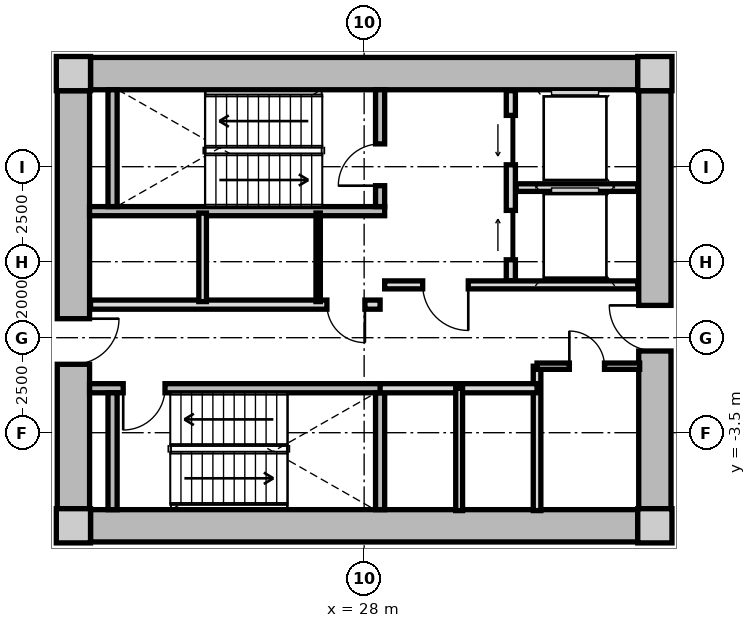
"""IFC4 building model, lengths in metres.
Left out: names, types, materials, properties, quantities, classifications, styles, units other than length and angle.
Written with IfcOpenShell. Run it as: python <this file> out.ifc"""

import sys

from ifc_helpers import new_model, si_unit, direction, frame, frame_2d, origin, origin_2d, place, context, subcontext, project, spatial, rectangle, extrude, source, transform, mapped, element, fill, save


model = new_model("IFC4")
c1 = context("Model", 3, precision=1e-05, world=origin(), true_north=direction((0.0, 1.0)))
c2 = subcontext(c1, "Body", "Model", "MODEL_VIEW")
j1 = project(units=[si_unit("LENGTHUNIT", "METRE"), si_unit("PLANEANGLEUNIT", "RADIAN")], contexts=[c1])
p1 = place(None, origin())
s1 = spatial("IfcSite", under=j1, at=p1, CompositionType="ELEMENT")
p2 = place(p1, origin())
s2 = spatial("IfcBuilding", under=s1, at=p2, CompositionType="ELEMENT")
p3 = place(p2, frame((0.0, 0.0, -4.2)))
s3 = spatial("IfcBuildingStorey", under=s2, at=p3, CompositionType="ELEMENT", Elevation=-4.2)
m1 = source(origin(), c2, "Body", "SweptSolid", [
    extrude(rectangle(XDim=0.9, YDim=0.9, at=origin_2d()), origin(), (0.0, 0.0, 1.0), 4.2),
])
for number, where, z_axis, x_axis in (
    (1, (20.35, -5.95, 0.0), (0.0, 0.0, 1.0), (1.0, 0.0, 0.0)),
    (2, (35.65, -5.95, 0.0), (0.0, 0.0, 1.0), (1.0, 0.0, 0.0)),
    (3, (35.65, 5.95, 0.0), (0.0, 0.0, 1.0), (1.0, 0.0, 0.0)),
    (4, (20.35, 5.95, 0.0), (0.0, 0.0, 1.0), (1.0, 0.0, 0.0)),
):
    element("IfcColumn", number, at=place(p3, frame(where, z_axis=z_axis, x_axis=x_axis)), inside=s3, PredefinedType="COLUMN", context=c2, shape_type="MappedRepresentation", body=[
        mapped(m1, transform((0.0, 0.0, 0.0), x_axis=(1.0, 0.0, 0.0), y_axis=(0.0, 1.0, 0.0), z_axis=(0.0, 0.0, 1.0), scale=1.0)),
    ])
m2 = source(origin(), c2, "Body", "SweptSolid", [
    extrude(rectangle(XDim=14.4, YDim=0.85, at=frame_2d((7.2, 0.0))), origin(), (0.0, 0.0, 1.0), 3.88),
])
for number, where, z_axis, x_axis in (
    (5, (20.8, 5.95, 0.0), (0.0, 0.0, 1.0), (1.0, 0.0, 0.0)),
    (6, (35.2, -5.95, 0.0), (0.0, 0.0, 1.0), (-1.0, 0.0, 0.0)),
):
    element("IfcWall", number, at=place(p3, frame(where, z_axis=z_axis, x_axis=x_axis)), inside=s3, PredefinedType="SHEAR", context=c2, shape_type="MappedRepresentation", body=[
        mapped(m2, transform((0.0, 0.0, 0.0), x_axis=(1.0, 0.0, 0.0), y_axis=(0.0, 1.0, 0.0), z_axis=(0.0, 0.0, 1.0), scale=1.0)),
    ])
m3 = source(origin(), c2, "Body", "SweptSolid", [
    extrude(rectangle(XDim=11.0, YDim=0.85, at=frame_2d((5.5, 0.0))), origin(), (0.0, 0.0, 1.0), 3.88),
])
p4 = place(p3, frame((20.35, -5.5, 0.0), z_axis=(0.0, 0.0, 1.0), x_axis=(0.0, 1.0, 0.0)))
e7 = element("IfcWall", 7, at=p4, inside=s3, PredefinedType="SHEAR", context=c2, shape_type="MappedRepresentation", body=[
    mapped(m3, transform((0.0, 0.0, 0.0), x_axis=(1.0, 0.0, 0.0), y_axis=(0.0, 1.0, 0.0), z_axis=(0.0, 0.0, 1.0), scale=1.0)),
])
p5 = place(p4, frame((3.8, 0.0, 0.0)))
e8 = element("IfcOpeningElement", 8, at=p5, cuts=e7, PredefinedType="OPENING", context=c2, shape_type="SweptSolid", body=[
    extrude(rectangle(XDim=1.2, YDim=2.15, at=frame_2d((0.6, 1.075))), frame((0.0, 0.435, 0.0), z_axis=(0.0, -1.0, 0.0), x_axis=(1.0, 0.0, 0.0)), (0.0, 0.0, 1.0), 0.87),
])
p6 = place(p3, frame((35.65, 5.5, 0.0), z_axis=(0.0, 0.0, 1.0), x_axis=(0.0, -1.0, 0.0)))
e9 = element("IfcWall", 9, at=p6, inside=s3, PredefinedType="SHEAR", context=c2, shape_type="MappedRepresentation", body=[
    mapped(m3, transform((0.0, 0.0, 0.0), x_axis=(1.0, 0.0, 0.0), y_axis=(0.0, 1.0, 0.0), z_axis=(0.0, 0.0, 1.0), scale=1.0)),
])
p7 = place(p6, frame((5.65, 0.0, 0.0)))
e10 = element("IfcOpeningElement", 10, at=p7, cuts=e9, PredefinedType="OPENING", context=c2, shape_type="SweptSolid", body=[
    extrude(rectangle(XDim=1.2, YDim=2.15, at=frame_2d((0.6, 1.075))), frame((0.0, 0.435, 0.0), z_axis=(0.0, -1.0, 0.0), x_axis=(1.0, 0.0, 0.0)), (0.0, 0.0, 1.0), 0.87),
])
m4 = source(origin(), c2, "Body", "SweptSolid", [
    extrude(rectangle(XDim=7.765, YDim=0.24, at=frame_2d((3.883, 0.0))), origin(), (0.0, 0.0, 1.0), 3.88),
])
p8 = place(p3, frame((20.775, 2.33, 0.0), z_axis=(0.0, 0.0, 1.0), x_axis=(1.0, 0.0, 0.0)))
e11 = element("IfcWall", 11, at=p8, inside=s3, PredefinedType="PARTITIONING", context=c2, shape_type="MappedRepresentation", body=[
    mapped(m4, transform((0.0, 0.0, 0.0), x_axis=(1.0, 0.0, 0.0), y_axis=(0.0, 1.0, 0.0), z_axis=(0.0, 0.0, 1.0), scale=1.0)),
])
m5 = source(origin(), c2, "Body", "SweptSolid", [
    extrude(rectangle(XDim=3.075, YDim=0.24, at=frame_2d((1.538, 0.0))), origin(), (0.0, 0.0, 1.0), 3.88),
])
p9 = place(p3, frame((21.38, 2.45, 0.0), z_axis=(0.0, 0.0, 1.0), x_axis=(0.0, 1.0, 0.0)))
e12 = element("IfcWall", 12, at=p9, inside=s3, PredefinedType="PARTITIONING", context=c2, shape_type="MappedRepresentation", body=[
    mapped(m5, transform((0.0, 0.0, 0.0), x_axis=(1.0, 0.0, 0.0), y_axis=(0.0, 1.0, 0.0), z_axis=(0.0, 0.0, 1.0), scale=1.0)),
])
p10 = place(p3, frame((28.42, 2.45, 0.0), z_axis=(0.0, 0.0, 1.0), x_axis=(0.0, 1.0, 0.0)))
e13 = element("IfcWall", 13, at=p10, inside=s3, PredefinedType="PARTITIONING", context=c2, shape_type="MappedRepresentation", body=[
    mapped(m5, transform((0.0, 0.0, 0.0), x_axis=(1.0, 0.0, 0.0), y_axis=(0.0, 1.0, 0.0), z_axis=(0.0, 0.0, 1.0), scale=1.0)),
])
p11 = place(p10, frame((0.55, 0.0, 0.0)))
e14 = element("IfcOpeningElement", 14, at=p11, cuts=e13, PredefinedType="OPENING", context=c2, shape_type="SweptSolid", body=[
    extrude(rectangle(XDim=1.1, YDim=2.15, at=frame_2d((0.55, 1.075))), frame((0.0, 0.13, 0.0), z_axis=(0.0, -1.0, 0.0), x_axis=(1.0, 0.0, 0.0)), (0.0, 0.0, 1.0), 0.26),
])
p12 = place(p3, frame((20.775, -2.33, 0.0), z_axis=(0.0, 0.0, 1.0), x_axis=(1.0, 0.0, 0.0)))
e15 = element("IfcWall", 15, at=p12, inside=s3, PredefinedType="PARTITIONING", context=c2, shape_type="MappedRepresentation", body=[
    mapped(m4, transform((0.0, 0.0, 0.0), x_axis=(1.0, 0.0, 0.0), y_axis=(0.0, 1.0, 0.0), z_axis=(0.0, 0.0, 1.0), scale=1.0)),
])
p13 = place(p12, frame((0.885, 0.0, 0.0)))
e16 = element("IfcOpeningElement", 16, at=p13, cuts=e15, PredefinedType="OPENING", context=c2, shape_type="SweptSolid", body=[
    extrude(rectangle(XDim=1.1, YDim=2.15, at=frame_2d((0.55, 1.075))), frame((0.0, 0.13, 0.0), z_axis=(0.0, -1.0, 0.0), x_axis=(1.0, 0.0, 0.0)), (0.0, 0.0, 1.0), 0.26),
])
for number, where, z_axis, x_axis in (
    (17, (21.38, -5.525, 0.0), (0.0, 0.0, 1.0), (0.0, 1.0, 0.0)),
    (18, (28.42, -5.525, 0.0), (0.0, 0.0, 1.0), (0.0, 1.0, 0.0)),
):
    element("IfcWall", number, at=place(p3, frame(where, z_axis=z_axis, x_axis=x_axis)), inside=s3, PredefinedType="PARTITIONING", context=c2, shape_type="MappedRepresentation", body=[
        mapped(m5, transform((0.0, 0.0, 0.0), x_axis=(1.0, 0.0, 0.0), y_axis=(0.0, 1.0, 0.0), z_axis=(0.0, 0.0, 1.0), scale=1.0)),
    ])
m6 = source(origin(), c2, "Body", "SweptSolid", [
    extrude(rectangle(XDim=5.0, YDim=0.24, at=frame_2d((2.5, 0.0))), origin(), (0.0, 0.0, 1.0), 3.865),
])
p14 = place(p3, frame((31.86, 0.5, 0.0), z_axis=(0.0, 0.0, 1.0), x_axis=(0.0, 1.0, 0.0)))
e19 = element("IfcWall", 19, at=p14, inside=s3, PredefinedType="PARTITIONING", context=c2, shape_type="MappedRepresentation", body=[
    mapped(m6, transform((0.0, 0.0, 0.0), x_axis=(1.0, 0.0, 0.0), y_axis=(0.0, 1.0, 0.0), z_axis=(0.0, 0.0, 1.0), scale=1.0)),
])
p15 = place(p14, frame((3.05, 0.0, 0.0)))
e20 = element("IfcOpeningElement", 20, at=p15, cuts=e19, PredefinedType="OPENING", context=c2, shape_type="SweptSolid", body=[
    extrude(rectangle(XDim=1.3, YDim=2.2, at=frame_2d((0.65, 1.1))), frame((0.0, 0.13, 0.0), z_axis=(0.0, -1.0, 0.0), x_axis=(1.0, 0.0, 0.0)), (0.0, 0.0, 1.0), 0.26),
])
p16 = place(p14, frame((0.55, 0.0, 0.0)))
e21 = element("IfcOpeningElement", 21, at=p16, cuts=e19, PredefinedType="OPENING", context=c2, shape_type="SweptSolid", body=[
    extrude(rectangle(XDim=1.3, YDim=2.2, at=frame_2d((0.65, 1.1))), frame((0.0, 0.13, 0.0), z_axis=(0.0, -1.0, 0.0), x_axis=(1.0, 0.0, 0.0)), (0.0, 0.0, 1.0), 0.26),
])
m7 = source(origin(), c2, "Body", "SweptSolid", [
    extrude(rectangle(XDim=3.2, YDim=0.2, at=frame_2d((1.6, 0.0))), origin(), (0.0, 0.0, 1.0), 3.865),
])
p17 = place(p3, frame((32.0, 2.95, 0.0), z_axis=(0.0, 0.0, 1.0), x_axis=(1.0, 0.0, 0.0)))
e22 = element("IfcWall", 22, at=p17, inside=s3, PredefinedType="PARTITIONING", context=c2, shape_type="MappedRepresentation", body=[
    mapped(m7, transform((0.0, 0.0, 0.0), x_axis=(1.0, 0.0, 0.0), y_axis=(0.0, 1.0, 0.0), z_axis=(0.0, 0.0, 1.0), scale=1.0)),
])
m8 = source(origin(), c2, "Body", "SweptSolid", [
    extrude(rectangle(XDim=6.66, YDim=0.21, at=frame_2d((3.33, 0.0))), origin(), (0.0, 0.0, 1.0), 3.865),
])
p18 = place(p3, frame((28.54, 0.39, 0.0), z_axis=(0.0, 0.0, 1.0), x_axis=(1.0, 0.0, 0.0)))
e23 = element("IfcWall", 23, at=p18, inside=s3, PredefinedType="PARTITIONING", context=c2, shape_type="MappedRepresentation", body=[
    mapped(m8, transform((0.0, 0.0, 0.0), x_axis=(1.0, 0.0, 0.0), y_axis=(0.0, 1.0, 0.0), z_axis=(0.0, 0.0, 1.0), scale=1.0)),
])
p19 = place(p18, frame((1.0, 0.0, 0.0)))
e24 = element("IfcOpeningElement", 24, at=p19, cuts=e23, PredefinedType="OPENING", context=c2, shape_type="SweptSolid", body=[
    extrude(rectangle(XDim=1.2, YDim=2.15, at=frame_2d((0.6, 1.075))), frame((0.0, 0.115, 0.0), z_axis=(0.0, -1.0, 0.0), x_axis=(1.0, 0.0, 0.0)), (0.0, 0.0, 1.0), 0.23),
])
m9 = source(origin(), c2, "Body", "SweptSolid", [
    extrude(rectangle(XDim=7.62, YDim=0.24, at=frame_2d((3.81, 0.0))), origin(), (0.0, 0.0, 1.0), 3.865),
])
p20 = place(p3, frame((20.8, -0.13, 0.0), z_axis=(0.0, 0.0, 1.0), x_axis=(1.0, 0.0, 0.0)))
e25 = element("IfcWall", 25, at=p20, inside=s3, PredefinedType="PARTITIONING", context=c2, shape_type="MappedRepresentation", body=[
    mapped(m9, transform((0.0, 0.0, 0.0), x_axis=(1.0, 0.0, 0.0), y_axis=(0.0, 1.0, 0.0), z_axis=(0.0, 0.0, 1.0), scale=1.0)),
])
p21 = place(p20, frame((6.22, 0.0, 0.0)))
e26 = element("IfcOpeningElement", 26, at=p21, cuts=e25, PredefinedType="OPENING", context=c2, shape_type="SweptSolid", body=[
    extrude(rectangle(XDim=1.0, YDim=2.1, at=frame_2d((0.5, 1.05))), frame((0.0, 0.13, 0.0), z_axis=(0.0, -1.0, 0.0), x_axis=(1.0, 0.0, 0.0)), (0.0, 0.0, 1.0), 0.26),
])
m10 = source(origin(), c2, "Body", "SweptSolid", [
    extrude(rectangle(XDim=2.33, YDim=0.115, at=frame_2d((1.165, 0.0))), origin(), (0.0, 0.0, 1.0), 3.865),
])
p22 = place(p3, frame((26.79, -0.05, 0.0), z_axis=(0.0, 0.0, 1.0), x_axis=(0.0, 1.0, 0.0)))
e27 = element("IfcWall", 27, at=p22, inside=s3, PredefinedType="PARTITIONING", context=c2, shape_type="MappedRepresentation", body=[
    mapped(m10, transform((0.0, 0.0, 0.0), x_axis=(1.0, 0.0, 0.0), y_axis=(0.0, 1.0, 0.0), z_axis=(0.0, 0.0, 1.0), scale=1.0)),
])
m11 = source(origin(), c2, "Body", "SweptSolid", [
    extrude(rectangle(XDim=2.33, YDim=0.2, at=frame_2d((1.165, 0.0))), origin(), (0.0, 0.0, 1.0), 3.865),
])
p23 = place(p3, frame((23.75, -0.05, 0.0), z_axis=(0.0, 0.0, 1.0), x_axis=(0.0, 1.0, 0.0)))
e28 = element("IfcWall", 28, at=p23, inside=s3, PredefinedType="PARTITIONING", context=c2, shape_type="MappedRepresentation", body=[
    mapped(m11, transform((0.0, 0.0, 0.0), x_axis=(1.0, 0.0, 0.0), y_axis=(0.0, 1.0, 0.0), z_axis=(0.0, 0.0, 1.0), scale=1.0)),
])
m12 = source(origin(), c2, "Body", "SweptSolid", [
    extrude(rectangle(XDim=3.8, YDim=0.2, at=frame_2d((1.9, 0.0))), origin(), (0.0, 0.0, 1.0), 3.865),
])
p24 = place(p3, frame((32.55, -5.55, 0.0), z_axis=(0.0, 0.0, 1.0), x_axis=(0.0, 1.0, 0.0)))
e29 = element("IfcWall", 29, at=p24, inside=s3, PredefinedType="PARTITIONING", context=c2, shape_type="MappedRepresentation", body=[
    mapped(m12, transform((0.0, 0.0, 0.0), x_axis=(1.0, 0.0, 0.0), y_axis=(0.0, 1.0, 0.0), z_axis=(0.0, 0.0, 1.0), scale=1.0)),
])
m13 = source(origin(), c2, "Body", "SweptSolid", [
    extrude(rectangle(XDim=4.13, YDim=0.24, at=frame_2d((2.065, 0.0))), origin(), (0.0, 0.0, 1.0), 3.865),
])
p25 = place(p3, frame((28.42, -2.33, 0.0), z_axis=(0.0, 0.0, 1.0), x_axis=(1.0, 0.0, 0.0)))
e30 = element("IfcWall", 30, at=p25, inside=s3, PredefinedType="PARTITIONING", context=c2, shape_type="MappedRepresentation", body=[
    mapped(m13, transform((0.0, 0.0, 0.0), x_axis=(1.0, 0.0, 0.0), y_axis=(0.0, 1.0, 0.0), z_axis=(0.0, 0.0, 1.0), scale=1.0)),
])
m14 = source(origin(), c2, "Body", "SweptSolid", [
    extrude(rectangle(XDim=3.22, YDim=0.18, at=frame_2d((1.61, 0.0))), origin(), (0.0, 0.0, 1.0), 3.865),
])
p26 = place(p3, frame((30.5, -5.55, 0.0), z_axis=(0.0, 0.0, 1.0), x_axis=(0.0, 1.0, 0.0)))
e31 = element("IfcWall", 31, at=p26, inside=s3, PredefinedType="PARTITIONING", context=c2, shape_type="MappedRepresentation", body=[
    mapped(m14, transform((0.0, 0.0, 0.0), x_axis=(1.0, 0.0, 0.0), y_axis=(0.0, 1.0, 0.0), z_axis=(0.0, 0.0, 1.0), scale=1.0)),
])
m15 = source(origin(), c2, "Body", "SweptSolid", [
    extrude(rectangle(XDim=2.7, YDim=0.165, at=frame_2d((1.35, 0.0))), origin(), (0.0, 0.0, 1.0), 3.865),
])
p27 = place(p3, frame((32.55, -1.75, 0.0), z_axis=(0.0, 0.0, 1.0), x_axis=(1.0, 0.0, 0.0)))
e32 = element("IfcWall", 32, at=p27, inside=s3, PredefinedType="PARTITIONING", context=c2, shape_type="MappedRepresentation", body=[
    mapped(m15, transform((0.0, 0.0, 0.0), x_axis=(1.0, 0.0, 0.0), y_axis=(0.0, 1.0, 0.0), z_axis=(0.0, 0.0, 1.0), scale=1.0)),
])
p28 = place(p27, frame((0.85, 0.0, 0.0)))
e33 = element("IfcOpeningElement", 33, at=p28, cuts=e32, PredefinedType="OPENING", context=c2, shape_type="SweptSolid", body=[
    extrude(rectangle(XDim=0.925, YDim=2.1, at=frame_2d((0.462, 1.05))), frame((0.0, 0.093, 0.0), z_axis=(0.0, -1.0, 0.0), x_axis=(1.0, 0.0, 0.0)), (0.0, 0.0, 1.0), 0.185),
])
m16 = source(origin(), c2, "Body", "SweptSolid", [
    extrude(rectangle(XDim=1.1, YDim=2.15, at=frame_2d((0.55, 1.075))), frame((0.0, 0.025, 0.0), z_axis=(0.0, -1.0, 0.0), x_axis=(1.0, 0.0, 0.0)), (0.0, 0.0, 1.0), 0.05),
])
p29 = place(p11, origin())
e34 = element("IfcDoor", 34, at=p29, inside=s3, OperationType="SINGLE_SWING_LEFT", PredefinedType="DOOR", context=c2, shape_type="MappedRepresentation", body=[
    mapped(m16, transform((0.0, 0.0, 0.0), x_axis=(1.0, 0.0, 0.0), y_axis=(0.0, 1.0, 0.0), z_axis=(0.0, 0.0, 1.0), scale=1.0)),
])
fill(e14, e34)
p30 = place(p13, frame((1.1, 0.0, 0.0), z_axis=(0.0, 0.0, 1.0), x_axis=(-1.0, 0.0, 0.0)))
e35 = element("IfcDoor", 35, at=p30, inside=s3, OperationType="SINGLE_SWING_RIGHT", PredefinedType="DOOR", context=c2, shape_type="MappedRepresentation", body=[
    mapped(m16, transform((0.0, 0.0, 0.0), x_axis=(1.0, 0.0, 0.0), y_axis=(0.0, 1.0, 0.0), z_axis=(0.0, 0.0, 1.0), scale=1.0)),
])
fill(e16, e35)
m17 = source(origin(), c2, "Body", "SweptSolid", [
    extrude(rectangle(XDim=1.3, YDim=2.2, at=frame_2d((0.65, 1.1))), frame((0.0, 0.025, 0.0), z_axis=(0.0, -1.0, 0.0), x_axis=(1.0, 0.0, 0.0)), (0.0, 0.0, 1.0), 0.05),
])
p31 = place(p15, origin())
e36 = element("IfcDoor", 36, at=p31, inside=s3, OperationType="SLIDING_TO_LEFT", PredefinedType="DOOR", context=c2, shape_type="MappedRepresentation", body=[
    mapped(m17, transform((0.0, 0.0, 0.0), x_axis=(1.0, 0.0, 0.0), y_axis=(0.0, 1.0, 0.0), z_axis=(0.0, 0.0, 1.0), scale=1.0)),
])
fill(e20, e36)
p32 = place(p16, origin())
e37 = element("IfcDoor", 37, at=p32, inside=s3, OperationType="SLIDING_TO_RIGHT", PredefinedType="DOOR", context=c2, shape_type="MappedRepresentation", body=[
    mapped(m17, transform((0.0, 0.0, 0.0), x_axis=(1.0, 0.0, 0.0), y_axis=(0.0, 1.0, 0.0), z_axis=(0.0, 0.0, 1.0), scale=1.0)),
])
fill(e21, e37)
m18 = source(origin(), c2, "Body", "SweptSolid", [
    extrude(rectangle(XDim=1.2, YDim=2.15, at=frame_2d((0.6, 1.075))), frame((0.0, 0.025, 0.0), z_axis=(0.0, -1.0, 0.0), x_axis=(1.0, 0.0, 0.0)), (0.0, 0.0, 1.0), 0.05),
])
p33 = place(p19, frame((1.2, 0.0, 0.0), z_axis=(0.0, 0.0, 1.0), x_axis=(-1.0, 0.0, 0.0)))
e38 = element("IfcDoor", 38, at=p33, inside=s3, OperationType="SINGLE_SWING_LEFT", PredefinedType="DOOR", context=c2, shape_type="MappedRepresentation", body=[
    mapped(m18, transform((0.0, 0.0, 0.0), x_axis=(1.0, 0.0, 0.0), y_axis=(0.0, 1.0, 0.0), z_axis=(0.0, 0.0, 1.0), scale=1.0)),
])
fill(e24, e38)
p34 = place(p5, frame((1.2, 0.0, 0.0), z_axis=(0.0, 0.0, 1.0), x_axis=(-1.0, 0.0, 0.0)))
e39 = element("IfcDoor", 39, at=p34, inside=s3, OperationType="SINGLE_SWING_LEFT", PredefinedType="DOOR", context=c2, shape_type="MappedRepresentation", body=[
    mapped(m18, transform((0.0, 0.0, 0.0), x_axis=(1.0, 0.0, 0.0), y_axis=(0.0, 1.0, 0.0), z_axis=(0.0, 0.0, 1.0), scale=1.0)),
])
fill(e8, e39)
p35 = place(p7, frame((1.2, 0.0, 0.0), z_axis=(0.0, 0.0, 1.0), x_axis=(-1.0, 0.0, 0.0)))
e40 = element("IfcDoor", 40, at=p35, inside=s3, OperationType="SINGLE_SWING_RIGHT", PredefinedType="DOOR", context=c2, shape_type="MappedRepresentation", body=[
    mapped(m18, transform((0.0, 0.0, 0.0), x_axis=(1.0, 0.0, 0.0), y_axis=(0.0, 1.0, 0.0), z_axis=(0.0, 0.0, 1.0), scale=1.0)),
])
fill(e10, e40)
m19 = source(origin(), c2, "Body", "SweptSolid", [
    extrude(rectangle(XDim=1.0, YDim=2.1, at=frame_2d((0.5, 1.05))), frame((0.0, 0.025, 0.0), z_axis=(0.0, -1.0, 0.0), x_axis=(1.0, 0.0, 0.0)), (0.0, 0.0, 1.0), 0.05),
])
p36 = place(p21, frame((1.0, 0.0, 0.0), z_axis=(0.0, 0.0, 1.0), x_axis=(-1.0, 0.0, 0.0)))
e41 = element("IfcDoor", 41, at=p36, inside=s3, OperationType="SINGLE_SWING_LEFT", PredefinedType="DOOR", context=c2, shape_type="MappedRepresentation", body=[
    mapped(m19, transform((0.0, 0.0, 0.0), x_axis=(1.0, 0.0, 0.0), y_axis=(0.0, 1.0, 0.0), z_axis=(0.0, 0.0, 1.0), scale=1.0)),
])
fill(e26, e41)
m20 = source(origin(), c2, "Body", "SweptSolid", [
    extrude(rectangle(XDim=0.925, YDim=2.1, at=frame_2d((0.462, 1.05))), frame((0.0, 0.025, 0.0), z_axis=(0.0, -1.0, 0.0), x_axis=(1.0, 0.0, 0.0)), (0.0, 0.0, 1.0), 0.05),
])
p37 = place(p28, origin())
e42 = element("IfcDoor", 42, at=p37, inside=s3, OperationType="SINGLE_SWING_LEFT", PredefinedType="DOOR", context=c2, shape_type="MappedRepresentation", body=[
    mapped(m20, transform((0.0, 0.0, 0.0), x_axis=(1.0, 0.0, 0.0), y_axis=(0.0, 1.0, 0.0), z_axis=(0.0, 0.0, 1.0), scale=1.0)),
])
fill(e33, e42)
save(model, sys.argv[1])
